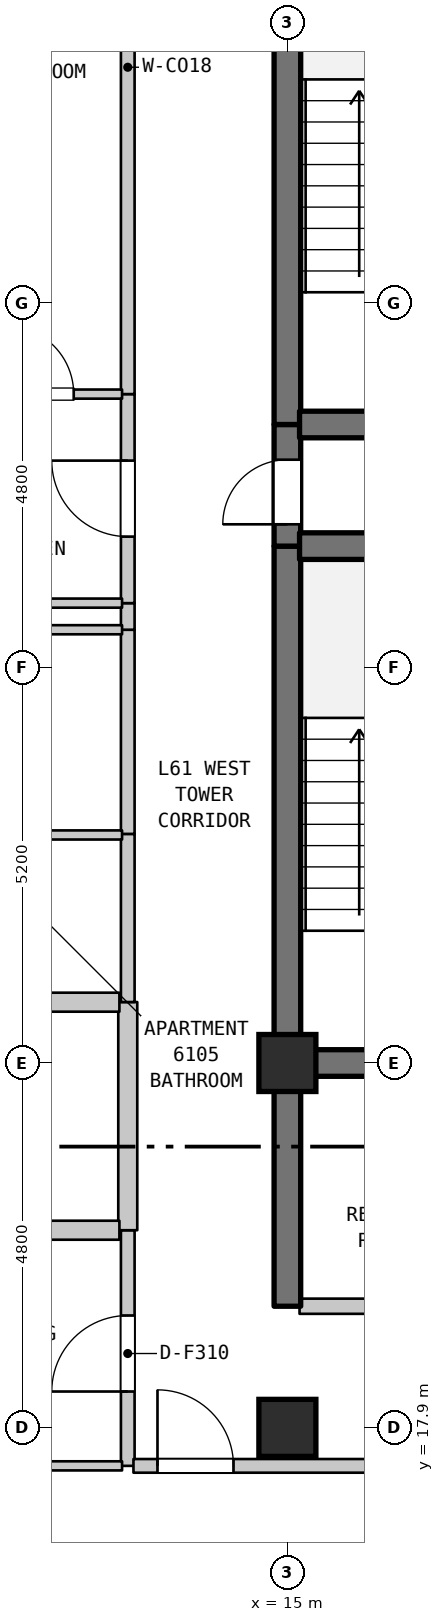
"""IFC4 building model, lengths in metres.
Left out: names, types, materials, properties, quantities, classifications, styles, units other than length and angle.
Written with IfcOpenShell. Run it as: python <this file> out.ifc"""

import sys

from ifc_helpers import new_model, si_unit, direction, frame, frame_2d, origin, origin_2d, place, context, subcontext, project, spatial, rectangle, extrude, element, fill, save


model = new_model("IFC4")
c1 = context("Model", 3, precision=1e-05, world=origin(), true_north=direction((0.0, 1.0)))
c2 = subcontext(c1, "Body", "Model", "MODEL_VIEW")
j1 = project(units=[si_unit("LENGTHUNIT", "METRE"), si_unit("PLANEANGLEUNIT", "RADIAN")], contexts=[c1])
p1 = place(None, origin())
s1 = spatial("IfcSite", under=j1, at=p1, CompositionType="ELEMENT")
p2 = place(p1, origin())
s2 = spatial("IfcBuilding", under=s1, at=p2, CompositionType="ELEMENT")
p3 = place(p2, frame((0.0, 0.0, 247.3)))
s3 = spatial("IfcBuildingStorey", under=s2, at=p3, CompositionType="ELEMENT", Elevation=247.3)
for number, where, z_axis, x_axis in (
    (1, (15.0, 17.9, 0.0), (0.0, 0.0, 1.0), (1.0, 0.0, 0.0)),
    (2, (15.0, 22.7, 0.0), (0.0, 0.0, 1.0), (1.0, 0.0, 0.0)),
):
    element("IfcColumn", number, at=place(p3, frame(where, z_axis=z_axis, x_axis=x_axis)), inside=s3, PredefinedType="COLUMN", context=c2, shape_type="SweptSolid", body=[
        extrude(rectangle(XDim=0.75, YDim=0.75, at=origin_2d()), origin(), (0.0, 0.0, 1.0), 3.7),
    ])
p4 = place(p3, frame((12.9, 17.4, 0.0), z_axis=(0.0, 0.0, 1.0), x_axis=(0.0, 1.0, 0.0)))
e3 = element("IfcWall", 3, at=p4, inside=s3, PredefinedType="STANDARD", context=c2, shape_type="SweptSolid", body=[
    extrude(rectangle(XDim=3.1, YDim=0.18, at=frame_2d((1.55, 0.0))), origin(), (0.0, 0.0, 1.0), 3.39),
])
p5 = place(p4, frame((0.978, 0.0, 0.0)))
e4 = element("IfcOpeningElement", 4, at=p5, cuts=e3, PredefinedType="OPENING", context=c2, shape_type="SweptSolid", body=[
    extrude(rectangle(XDim=1.0, YDim=2.15, at=frame_2d((0.5, 1.075))), frame((0.0, 0.1, 0.0), z_axis=(0.0, -1.0, 0.0), x_axis=(1.0, 0.0, 0.0)), (0.0, 0.0, 1.0), 0.2),
])
p6 = place(p3, frame((12.9, 20.5, 0.0), z_axis=(0.0, 0.0, 1.0), x_axis=(0.0, 1.0, 0.0)))
e5 = element("IfcWall", 5, at=p6, inside=s3, PredefinedType="STANDARD", context=c2, shape_type="SweptSolid", body=[
    extrude(rectangle(XDim=3.002, YDim=0.25, at=frame_2d((1.501, 0.0))), origin(), (0.0, 0.0, 1.0), 3.39),
])
p7 = place(p3, frame((12.9, 23.502, 0.0), z_axis=(0.0, 0.0, 1.0), x_axis=(0.0, 1.0, 0.0)))
e6 = element("IfcWall", 6, at=p7, inside=s3, PredefinedType="STANDARD", context=c2, shape_type="SweptSolid", body=[
    extrude(rectangle(XDim=2.212, YDim=0.18, at=frame_2d((1.106, 0.0))), origin(), (0.0, 0.0, 1.0), 3.39),
])
p8 = place(p3, frame((12.9, 25.714, 0.0), z_axis=(0.0, 0.0, 1.0), x_axis=(0.0, 1.0, 0.0)))
e7 = element("IfcWall", 7, at=p8, inside=s3, PredefinedType="STANDARD", context=c2, shape_type="SweptSolid", body=[
    extrude(rectangle(XDim=2.686, YDim=0.18, at=frame_2d((1.343, 0.0))), origin(), (0.0, 0.0, 1.0), 3.39),
])
p9 = place(p3, frame((12.9, 28.4, 0.0), z_axis=(0.0, 0.0, 1.0), x_axis=(0.0, 1.0, 0.0)))
e8 = element("IfcWall", 8, at=p9, inside=s3, PredefinedType="STANDARD", context=c2, shape_type="SweptSolid", body=[
    extrude(rectangle(XDim=0.35, YDim=0.18, at=frame_2d((0.175, 0.0))), origin(), (0.0, 0.0, 1.0), 3.39),
])
p10 = place(p3, frame((12.9, 28.75, 0.0), z_axis=(0.0, 0.0, 1.0), x_axis=(0.0, 1.0, 0.0)))
e9 = element("IfcWall", 9, at=p10, inside=s3, PredefinedType="STANDARD", context=c2, shape_type="SweptSolid", body=[
    extrude(rectangle(XDim=2.75, YDim=0.18, at=frame_2d((1.375, 0.0))), origin(), (0.0, 0.0, 1.0), 3.39),
])
p11 = place(p10, frame((0.875, 0.0, 0.0)))
e10 = element("IfcOpeningElement", 10, at=p11, cuts=e9, PredefinedType="OPENING", context=c2, shape_type="SweptSolid", body=[
    extrude(rectangle(XDim=1.0, YDim=2.15, at=frame_2d((0.5, 1.075))), frame((0.0, 0.1, 0.0), z_axis=(0.0, -1.0, 0.0), x_axis=(1.0, 0.0, 0.0)), (0.0, 0.0, 1.0), 0.2),
])
p12 = place(p3, frame((12.9, 31.5, 0.0), z_axis=(0.0, 0.0, 1.0), x_axis=(0.0, 1.0, 0.0)))
e11 = element("IfcWall", 11, at=p12, inside=s3, PredefinedType="STANDARD", context=c2, shape_type="SweptSolid", body=[
    extrude(rectangle(XDim=8.6, YDim=0.18, at=frame_2d((4.3, 0.0))), origin(), (0.0, 0.0, 1.0), 3.39),
])
p13 = place(p3, frame((15.0, 19.5, 0.0), z_axis=(0.0, 0.0, 1.0), x_axis=(0.0, 1.0, 0.0)))
e12 = element("IfcWall", 12, at=p13, inside=s3, PredefinedType="SHEAR", context=c2, shape_type="SweptSolid", body=[
    extrude(rectangle(XDim=3.2, YDim=0.35, at=frame_2d((1.6, 0.0))), origin(), (0.0, 0.0, 1.0), 3.39),
])
p14 = place(p3, frame((15.0, 22.7, 0.0), z_axis=(0.0, 0.0, 1.0), x_axis=(0.0, 1.0, 0.0)))
e13 = element("IfcWall", 13, at=p14, inside=s3, PredefinedType="SHEAR", context=c2, shape_type="SweptSolid", body=[
    extrude(rectangle(XDim=6.8, YDim=0.35, at=frame_2d((3.4, 0.0))), origin(), (0.0, 0.0, 1.0), 3.39),
])
p15 = place(p3, frame((15.0, 29.5, 0.0), z_axis=(0.0, 0.0, 1.0), x_axis=(0.0, 1.0, 0.0)))
e14 = element("IfcWall", 14, at=p15, inside=s3, PredefinedType="SHEAR", context=c2, shape_type="SweptSolid", body=[
    extrude(rectangle(XDim=1.6, YDim=0.35, at=frame_2d((0.8, 0.0))), origin(), (0.0, 0.0, 1.0), 3.39),
])
p16 = place(p15, frame((0.287, 0.0, 0.0)))
e15 = element("IfcOpeningElement", 15, at=p16, cuts=e14, PredefinedType="OPENING", context=c2, shape_type="SweptSolid", body=[
    extrude(rectangle(XDim=0.85, YDim=2.1, at=frame_2d((0.425, 1.05))), frame((0.0, 0.185, 0.0), z_axis=(0.0, -1.0, 0.0), x_axis=(1.0, 0.0, 0.0)), (0.0, 0.0, 1.0), 0.37),
])
p17 = place(p3, frame((15.0, 31.1, 0.0), z_axis=(0.0, 0.0, 1.0), x_axis=(0.0, 1.0, 0.0)))
e16 = element("IfcWall", 16, at=p17, inside=s3, PredefinedType="SHEAR", context=c2, shape_type="SweptSolid", body=[
    extrude(rectangle(XDim=6.8, YDim=0.35, at=frame_2d((3.4, 0.0))), origin(), (0.0, 0.0, 1.0), 3.39),
])
p18 = place(p3, frame((8.973, 17.4, 0.0), z_axis=(0.0, 0.0, 1.0), x_axis=(1.0, 0.0, 0.0)))
e17 = element("IfcWall", 17, at=p18, inside=s3, PredefinedType="PARTITIONING", context=c2, shape_type="SweptSolid", body=[
    extrude(rectangle(XDim=3.852, YDim=0.12, at=frame_2d((1.926, 0.0))), origin(), (0.0, 0.0, 1.0), 3.39),
])
p19 = place(p3, frame((12.975, 17.4, 0.0), z_axis=(0.0, 0.0, 1.0), x_axis=(1.0, 0.0, 0.0)))
e18 = element("IfcWall", 18, at=p19, inside=s3, PredefinedType="STANDARD", context=c2, shape_type="SweptSolid", body=[
    extrude(rectangle(XDim=3.49, YDim=0.18, at=frame_2d((1.745, 0.0))), origin(), (0.0, 0.0, 1.0), 3.39),
])
p20 = place(p19, frame((0.316, 0.0, 0.0)))
e19 = element("IfcOpeningElement", 19, at=p20, cuts=e18, PredefinedType="OPENING", context=c2, shape_type="SweptSolid", body=[
    extrude(rectangle(XDim=1.0, YDim=2.15, at=frame_2d((0.5, 1.075))), frame((0.0, 0.1, 0.0), z_axis=(0.0, -1.0, 0.0), x_axis=(1.0, 0.0, 0.0)), (0.0, 0.0, 1.0), 0.2),
])
p21 = place(p3, frame((15.16, 19.5, 0.0), z_axis=(0.0, 0.0, 1.0), x_axis=(1.0, 0.0, 0.0)))
e20 = element("IfcWall", 20, at=p21, inside=s3, PredefinedType="STANDARD", context=c2, shape_type="SweptSolid", body=[
    extrude(rectangle(XDim=3.68, YDim=0.2, at=frame_2d((1.84, 0.0))), origin(), (0.0, 0.0, 1.0), 3.39),
])
p22 = place(p21, frame((1.39, 0.0, 0.0)))
e21 = element("IfcOpeningElement", 21, at=p22, cuts=e20, PredefinedType="OPENING", context=c2, shape_type="SweptSolid", body=[
    extrude(rectangle(XDim=0.9, YDim=2.15, at=frame_2d((0.45, 1.075))), frame((0.0, 0.11, 0.0), z_axis=(0.0, -1.0, 0.0), x_axis=(1.0, 0.0, 0.0)), (0.0, 0.0, 1.0), 0.22),
])
p23 = place(p3, frame((10.76, 20.5, 0.0), z_axis=(0.0, 0.0, 1.0), x_axis=(1.0, 0.0, 0.0)))
e22 = element("IfcWall", 22, at=p23, inside=s3, PredefinedType="STANDARD", context=c2, shape_type="SweptSolid", body=[
    extrude(rectangle(XDim=2.03, YDim=0.25, at=frame_2d((1.015, 0.0))), origin(), (0.0, 0.0, 1.0), 3.39),
])
p24 = place(p3, frame((15.16, 22.7, 0.0), z_axis=(0.0, 0.0, 1.0), x_axis=(1.0, 0.0, 0.0)))
e23 = element("IfcWall", 23, at=p24, inside=s3, PredefinedType="SHEAR", context=c2, shape_type="SweptSolid", body=[
    extrude(rectangle(XDim=3.68, YDim=0.35, at=frame_2d((1.84, 0.0))), origin(), (0.0, 0.0, 1.0), 3.39),
])
p25 = place(p3, frame((10.76, 23.5, 0.0), z_axis=(0.0, 0.0, 1.0), x_axis=(1.0, 0.0, 0.0)))
e24 = element("IfcWall", 24, at=p25, inside=s3, PredefinedType="STANDARD", context=c2, shape_type="SweptSolid", body=[
    extrude(rectangle(XDim=2.03, YDim=0.25, at=frame_2d((1.015, 0.0))), origin(), (0.0, 0.0, 1.0), 3.39),
])
for number, where, z_axis, x_axis in (
    (25, (10.695, 25.7, 0.0), (0.0, 0.0, 1.0), (1.0, 0.0, 0.0)),
    (26, (10.695, 28.4, 0.0), (0.0, 0.0, 1.0), (1.0, 0.0, 0.0)),
):
    element("IfcWall", number, at=place(p3, frame(where, z_axis=z_axis, x_axis=x_axis)), inside=s3, PredefinedType="PARTITIONING", context=c2, shape_type="SweptSolid", body=[
        extrude(rectangle(XDim=2.13, YDim=0.12, at=frame_2d((1.065, 0.0))), origin(), (0.0, 0.0, 1.0), 3.39),
    ])
p26 = place(p3, frame((9.175, 28.75, 0.0), z_axis=(0.0, 0.0, 1.0), x_axis=(1.0, 0.0, 0.0)))
e27 = element("IfcWall", 27, at=p26, inside=s3, PredefinedType="PARTITIONING", context=c2, shape_type="SweptSolid", body=[
    extrude(rectangle(XDim=3.65, YDim=0.12, at=frame_2d((1.825, 0.0))), origin(), (0.0, 0.0, 1.0), 3.39),
])
for number, where, z_axis, x_axis in (
    (28, (15.16, 29.5, 0.0), (0.0, 0.0, 1.0), (1.0, 0.0, 0.0)),
    (29, (15.16, 31.1, 0.0), (0.0, 0.0, 1.0), (1.0, 0.0, 0.0)),
):
    element("IfcWall", number, at=place(p3, frame(where, z_axis=z_axis, x_axis=x_axis)), inside=s3, PredefinedType="SHEAR", context=c2, shape_type="SweptSolid", body=[
        extrude(rectangle(XDim=3.68, YDim=0.35, at=frame_2d((1.84, 0.0))), origin(), (0.0, 0.0, 1.0), 3.39),
    ])
p27 = place(p3, frame((10.623, 31.5, 0.0), z_axis=(0.0, 0.0, 1.0), x_axis=(1.0, 0.0, 0.0)))
e30 = element("IfcWall", 30, at=p27, inside=s3, PredefinedType="PARTITIONING", context=c2, shape_type="SweptSolid", body=[
    extrude(rectangle(XDim=2.202, YDim=0.12, at=frame_2d((1.101, 0.0))), origin(), (0.0, 0.0, 1.0), 3.39),
])
p28 = place(p27, frame((0.666, 0.0, 0.0)))
e31 = element("IfcOpeningElement", 31, at=p28, cuts=e30, PredefinedType="OPENING", context=c2, shape_type="SweptSolid", body=[
    extrude(rectangle(XDim=0.9, YDim=2.1, at=frame_2d((0.45, 1.05))), frame((0.0, 0.07, 0.0), z_axis=(0.0, -1.0, 0.0), x_axis=(1.0, 0.0, 0.0)), (0.0, 0.0, 1.0), 0.14),
])
p29 = place(p5, origin())
e32 = element("IfcDoor", 32, at=p29, inside=s3, OperationType="SINGLE_SWING_LEFT", PredefinedType="DOOR", context=c2, shape_type="SweptSolid", body=[
    extrude(rectangle(XDim=1.0, YDim=2.15, at=frame_2d((0.5, 1.075))), frame((0.0, 0.025, 0.0), z_axis=(0.0, -1.0, 0.0), x_axis=(1.0, 0.0, 0.0)), (0.0, 0.0, 1.0), 0.05),
])
fill(e4, e32)
p30 = place(p11, origin())
e33 = element("IfcDoor", 33, at=p30, inside=s3, OperationType="SINGLE_SWING_RIGHT", PredefinedType="DOOR", context=c2, shape_type="SweptSolid", body=[
    extrude(rectangle(XDim=1.0, YDim=2.15, at=frame_2d((0.5, 1.075))), frame((0.0, 0.025, 0.0), z_axis=(0.0, -1.0, 0.0), x_axis=(1.0, 0.0, 0.0)), (0.0, 0.0, 1.0), 0.05),
])
fill(e10, e33)
p31 = place(p16, origin())
e34 = element("IfcDoor", 34, at=p31, inside=s3, OperationType="SINGLE_SWING_LEFT", PredefinedType="DOOR", context=c2, shape_type="SweptSolid", body=[
    extrude(rectangle(XDim=0.85, YDim=2.1, at=frame_2d((0.425, 1.05))), frame((0.0, 0.025, 0.0), z_axis=(0.0, -1.0, 0.0), x_axis=(1.0, 0.0, 0.0)), (0.0, 0.0, 1.0), 0.05),
])
fill(e15, e34)
p32 = place(p20, origin())
e35 = element("IfcDoor", 35, at=p32, inside=s3, OperationType="SINGLE_SWING_LEFT", PredefinedType="DOOR", context=c2, shape_type="SweptSolid", body=[
    extrude(rectangle(XDim=1.0, YDim=2.15, at=frame_2d((0.5, 1.075))), frame((0.0, 0.025, 0.0), z_axis=(0.0, -1.0, 0.0), x_axis=(1.0, 0.0, 0.0)), (0.0, 0.0, 1.0), 0.05),
])
fill(e19, e35)
p33 = place(p28, origin())
e36 = element("IfcDoor", 36, at=p33, inside=s3, OperationType="SINGLE_SWING_LEFT", PredefinedType="DOOR", context=c2, shape_type="SweptSolid", body=[
    extrude(rectangle(XDim=0.9, YDim=2.1, at=frame_2d((0.45, 1.05))), frame((0.0, 0.025, 0.0), z_axis=(0.0, -1.0, 0.0), x_axis=(1.0, 0.0, 0.0)), (0.0, 0.0, 1.0), 0.05),
])
fill(e31, e36)
save(model, sys.argv[1])
